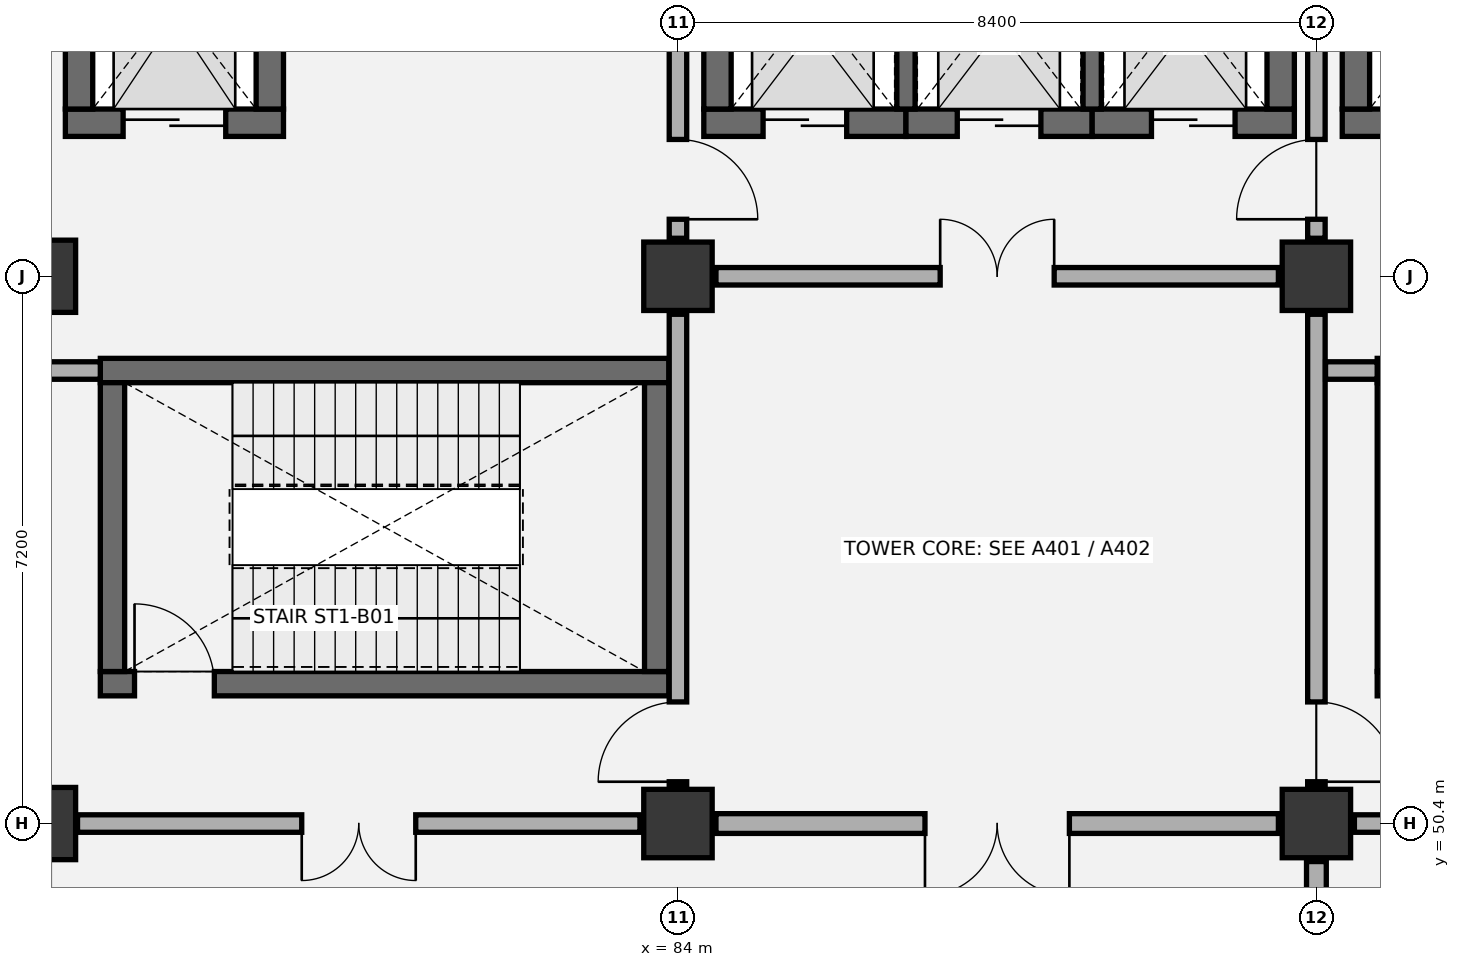
"""IFC4 building model, lengths in metres.
Left out: names, types, materials, properties, quantities, classifications, styles, units other than length and angle.
Written with IfcOpenShell. Run it as: python <this file> out.ifc"""

import sys

from ifc_helpers import new_model, si_unit, direction, frame, frame_2d, origin, origin_2d, place, context, subcontext, project, spatial, rectangle, extrude, element, fill, save


model = new_model("IFC4")
c1 = context("Model", 3, precision=1e-05, world=origin(), true_north=direction((0.0, 1.0)))
c2 = subcontext(c1, "Body", "Model", "MODEL_VIEW")
j1 = project(units=[si_unit("LENGTHUNIT", "METRE"), si_unit("PLANEANGLEUNIT", "RADIAN")], contexts=[c1])
p1 = place(None, origin())
s1 = spatial("IfcSite", under=j1, at=p1, CompositionType="ELEMENT")
p2 = place(p1, origin())
s2 = spatial("IfcBuilding", under=s1, at=p2, CompositionType="ELEMENT")
p3 = place(p2, frame((0.0, 0.0, -4.8)))
s3 = spatial("IfcBuildingStorey", under=s2, at=p3, CompositionType="ELEMENT", Elevation=-4.8)
for number, where, z_axis, x_axis in (
    (1, (75.6, 50.4, 0.0), (0.0, 0.0, 1.0), (1.0, 0.0, 0.0)),
    (2, (75.6, 57.6, 0.0), (0.0, 0.0, 1.0), (1.0, 0.0, 0.0)),
):
    element("IfcColumn", number, at=place(p3, frame(where, z_axis=z_axis, x_axis=x_axis)), inside=s3, PredefinedType="COLUMN", context=c2, shape_type="SweptSolid", body=[
        extrude(rectangle(XDim=0.95, YDim=0.95, at=origin_2d()), origin(), (0.0, 0.0, 1.0), 4.8),
    ])
for number, where, z_axis, x_axis in (
    (3, (84.0, 50.4, 0.0), (0.0, 0.0, 1.0), (1.0, 0.0, 0.0)),
    (4, (84.0, 57.6, 0.0), (0.0, 0.0, 1.0), (1.0, 0.0, 0.0)),
    (5, (92.4, 50.4, 0.0), (0.0, 0.0, 1.0), (1.0, 0.0, 0.0)),
    (6, (92.4, 57.6, 0.0), (0.0, 0.0, 1.0), (1.0, 0.0, 0.0)),
):
    element("IfcColumn", number, at=place(p3, frame(where, z_axis=z_axis, x_axis=x_axis)), inside=s3, PredefinedType="COLUMN", context=c2, shape_type="SweptSolid", body=[
        extrude(rectangle(XDim=0.9, YDim=0.9, at=origin_2d()), origin(), (0.0, 0.0, 1.0), 4.8),
    ])
p4 = place(p3, frame((76.4, 52.24, 0.0), z_axis=(0.0, 0.0, 1.0), x_axis=(1.0, 0.0, 0.0)))
e7 = element("IfcWall", 7, at=p4, inside=s3, PredefinedType="SHEAR", context=c2, shape_type="SweptSolid", body=[
    extrude(rectangle(XDim=7.48, YDim=0.32, at=frame_2d((3.74, 0.0))), origin(), (0.0, 0.0, 1.0), 4.45),
])
p5 = place(p4, frame((0.45, 0.0, 0.0)))
e8 = element("IfcOpeningElement", 8, at=p5, cuts=e7, PredefinedType="OPENING", context=c2, shape_type="SweptSolid", body=[
    extrude(rectangle(XDim=1.05, YDim=2.15, at=frame_2d((0.525, 1.075))), frame((0.0, 0.17, 0.0), z_axis=(0.0, -1.0, 0.0), x_axis=(1.0, 0.0, 0.0)), (0.0, 0.0, 1.0), 0.34),
])
p6 = place(p3, frame((76.4, 56.36, 0.0), z_axis=(0.0, 0.0, 1.0), x_axis=(1.0, 0.0, 0.0)))
e9 = element("IfcWall", 9, at=p6, inside=s3, PredefinedType="SHEAR", context=c2, shape_type="SweptSolid", body=[
    extrude(rectangle(XDim=7.48, YDim=0.32, at=frame_2d((3.74, 0.0))), origin(), (0.0, 0.0, 1.0), 4.45),
])
for number, where, z_axis, x_axis in (
    (10, (76.56, 52.4, 0.0), (0.0, 0.0, 1.0), (0.0, 1.0, 0.0)),
    (11, (83.72, 52.4, 0.0), (0.0, 0.0, 1.0), (0.0, 1.0, 0.0)),
):
    element("IfcWall", number, at=place(p3, frame(where, z_axis=z_axis, x_axis=x_axis)), inside=s3, PredefinedType="SHEAR", context=c2, shape_type="SweptSolid", body=[
        extrude(rectangle(XDim=3.8, YDim=0.32, at=frame_2d((1.9, 0.0))), origin(), (0.0, 0.0, 1.0), 4.45),
    ])
p7 = place(p3, frame((93.2, 52.24, 0.0), z_axis=(0.0, 0.0, 1.0), x_axis=(1.0, 0.0, 0.0)))
e12 = element("IfcWall", 12, at=p7, inside=s3, PredefinedType="SHEAR", context=c2, shape_type="SweptSolid", body=[
    extrude(rectangle(XDim=7.48, YDim=0.32, at=frame_2d((3.74, 0.0))), origin(), (0.0, 0.0, 1.0), 4.45),
])
p8 = place(p7, frame((0.45, 0.0, 0.0)))
e13 = element("IfcOpeningElement", 13, at=p8, cuts=e12, PredefinedType="OPENING", context=c2, shape_type="SweptSolid", body=[
    extrude(rectangle(XDim=1.05, YDim=2.15, at=frame_2d((0.525, 1.075))), frame((0.0, 0.17, 0.0), z_axis=(0.0, -1.0, 0.0), x_axis=(1.0, 0.0, 0.0)), (0.0, 0.0, 1.0), 0.34),
])
p9 = place(p3, frame((93.2, 56.36, 0.0), z_axis=(0.0, 0.0, 1.0), x_axis=(1.0, 0.0, 0.0)))
e14 = element("IfcWall", 14, at=p9, inside=s3, PredefinedType="SHEAR", context=c2, shape_type="SweptSolid", body=[
    extrude(rectangle(XDim=7.48, YDim=0.32, at=frame_2d((3.74, 0.0))), origin(), (0.0, 0.0, 1.0), 4.45),
])
p10 = place(p3, frame((93.36, 52.4, 0.0), z_axis=(0.0, 0.0, 1.0), x_axis=(0.0, 1.0, 0.0)))
e15 = element("IfcWall", 15, at=p10, inside=s3, PredefinedType="SHEAR", context=c2, shape_type="SweptSolid", body=[
    extrude(rectangle(XDim=3.8, YDim=0.32, at=frame_2d((1.9, 0.0))), origin(), (0.0, 0.0, 1.0), 4.45),
])
p11 = place(p3, frame((75.94, 59.62, 0.0), z_axis=(0.0, 0.0, 1.0), x_axis=(1.0, 0.0, 0.0)))
e16 = element("IfcWall", 16, at=p11, inside=s3, PredefinedType="SHEAR", context=c2, shape_type="SweptSolid", body=[
    extrude(rectangle(XDim=2.87, YDim=0.36, at=frame_2d((1.435, 0.0))), origin(), (0.0, 0.0, 1.0), 4.45),
])
p12 = place(p11, frame((0.76, 0.0, 0.0)))
e17 = element("IfcOpeningElement", 17, at=p12, cuts=e16, PredefinedType="OPENING", context=c2, shape_type="SweptSolid", body=[
    extrude(rectangle(XDim=1.35, YDim=2.2, at=frame_2d((0.675, 1.1))), frame((0.0, 0.19, 0.0), z_axis=(0.0, -1.0, 0.0), x_axis=(1.0, 0.0, 0.0)), (0.0, 0.0, 1.0), 0.38),
])
for number, where, z_axis, x_axis in (
    (18, (76.12, 59.8, 0.0), (0.0, 0.0, 1.0), (0.0, 1.0, 0.0)),
    (19, (78.63, 59.8, 0.0), (0.0, 0.0, 1.0), (0.0, 1.0, 0.0)),
):
    element("IfcWall", number, at=place(p3, frame(where, z_axis=z_axis, x_axis=x_axis)), inside=s3, PredefinedType="SHEAR", context=c2, shape_type="SweptSolid", body=[
        extrude(rectangle(XDim=2.8, YDim=0.36, at=frame_2d((1.4, 0.0))), origin(), (0.0, 0.0, 1.0), 4.45),
    ])
p13 = place(p3, frame((84.34, 59.62, 0.0), z_axis=(0.0, 0.0, 1.0), x_axis=(1.0, 0.0, 0.0)))
e20 = element("IfcWall", 20, at=p13, inside=s3, PredefinedType="SHEAR", context=c2, shape_type="SweptSolid", body=[
    extrude(rectangle(XDim=2.66, YDim=0.36, at=frame_2d((1.33, 0.0))), origin(), (0.0, 0.0, 1.0), 4.45),
])
p14 = place(p13, frame((0.78, 0.0, 0.0)))
e21 = element("IfcOpeningElement", 21, at=p14, cuts=e20, PredefinedType="OPENING", context=c2, shape_type="SweptSolid", body=[
    extrude(rectangle(XDim=1.1, YDim=2.15, at=frame_2d((0.55, 1.075))), frame((0.0, 0.19, 0.0), z_axis=(0.0, -1.0, 0.0), x_axis=(1.0, 0.0, 0.0)), (0.0, 0.0, 1.0), 0.38),
])
p15 = place(p3, frame((87.0, 59.62, 0.0), z_axis=(0.0, 0.0, 1.0), x_axis=(1.0, 0.0, 0.0)))
e22 = element("IfcWall", 22, at=p15, inside=s3, PredefinedType="SHEAR", context=c2, shape_type="SweptSolid", body=[
    extrude(rectangle(XDim=2.45, YDim=0.36, at=frame_2d((1.225, 0.0))), origin(), (0.0, 0.0, 1.0), 4.45),
])
p16 = place(p15, frame((0.675, 0.0, 0.0)))
e23 = element("IfcOpeningElement", 23, at=p16, cuts=e22, PredefinedType="OPENING", context=c2, shape_type="SweptSolid", body=[
    extrude(rectangle(XDim=1.1, YDim=2.15, at=frame_2d((0.55, 1.075))), frame((0.0, 0.19, 0.0), z_axis=(0.0, -1.0, 0.0), x_axis=(1.0, 0.0, 0.0)), (0.0, 0.0, 1.0), 0.38),
])
p17 = place(p3, frame((89.45, 59.62, 0.0), z_axis=(0.0, 0.0, 1.0), x_axis=(1.0, 0.0, 0.0)))
e24 = element("IfcWall", 24, at=p17, inside=s3, PredefinedType="SHEAR", context=c2, shape_type="SweptSolid", body=[
    extrude(rectangle(XDim=2.66, YDim=0.36, at=frame_2d((1.33, 0.0))), origin(), (0.0, 0.0, 1.0), 4.45),
])
p18 = place(p17, frame((0.78, 0.0, 0.0)))
e25 = element("IfcOpeningElement", 25, at=p18, cuts=e24, PredefinedType="OPENING", context=c2, shape_type="SweptSolid", body=[
    extrude(rectangle(XDim=1.1, YDim=2.15, at=frame_2d((0.55, 1.075))), frame((0.0, 0.19, 0.0), z_axis=(0.0, -1.0, 0.0), x_axis=(1.0, 0.0, 0.0)), (0.0, 0.0, 1.0), 0.38),
])
for number, where, z_axis, x_axis in (
    (26, (84.52, 59.8, 0.0), (0.0, 0.0, 1.0), (0.0, 1.0, 0.0)),
    (27, (91.93, 59.8, 0.0), (0.0, 0.0, 1.0), (0.0, 1.0, 0.0)),
):
    element("IfcWall", number, at=place(p3, frame(where, z_axis=z_axis, x_axis=x_axis)), inside=s3, PredefinedType="SHEAR", context=c2, shape_type="SweptSolid", body=[
        extrude(rectangle(XDim=2.8, YDim=0.36, at=frame_2d((1.4, 0.0))), origin(), (0.0, 0.0, 1.0), 4.45),
    ])
for number, where, z_axis, x_axis in (
    (28, (87.0, 59.8, 0.0), (0.0, 0.0, 1.0), (0.0, 1.0, 0.0)),
    (29, (89.45, 59.8, 0.0), (0.0, 0.0, 1.0), (0.0, 1.0, 0.0)),
):
    element("IfcWall", number, at=place(p3, frame(where, z_axis=z_axis, x_axis=x_axis)), inside=s3, PredefinedType="SHEAR", context=c2, shape_type="SweptSolid", body=[
        extrude(rectangle(XDim=2.8, YDim=0.24, at=frame_2d((1.4, 0.0))), origin(), (0.0, 0.0, 1.0), 4.45),
    ])
p19 = place(p3, frame((92.74, 59.62, 0.0), z_axis=(0.0, 0.0, 1.0), x_axis=(1.0, 0.0, 0.0)))
e30 = element("IfcWall", 30, at=p19, inside=s3, PredefinedType="SHEAR", context=c2, shape_type="SweptSolid", body=[
    extrude(rectangle(XDim=2.87, YDim=0.36, at=frame_2d((1.435, 0.0))), origin(), (0.0, 0.0, 1.0), 4.45),
])
p20 = place(p19, frame((0.76, 0.0, 0.0)))
e31 = element("IfcOpeningElement", 31, at=p20, cuts=e30, PredefinedType="OPENING", context=c2, shape_type="SweptSolid", body=[
    extrude(rectangle(XDim=1.35, YDim=2.2, at=frame_2d((0.675, 1.1))), frame((0.0, 0.19, 0.0), z_axis=(0.0, -1.0, 0.0), x_axis=(1.0, 0.0, 0.0)), (0.0, 0.0, 1.0), 0.38),
])
p21 = place(p3, frame((92.92, 59.8, 0.0), z_axis=(0.0, 0.0, 1.0), x_axis=(0.0, 1.0, 0.0)))
e32 = element("IfcWall", 32, at=p21, inside=s3, PredefinedType="SHEAR", context=c2, shape_type="SweptSolid", body=[
    extrude(rectangle(XDim=2.8, YDim=0.36, at=frame_2d((1.4, 0.0))), origin(), (0.0, 0.0, 1.0), 4.45),
])
p22 = place(p3, frame((76.1, 50.4, 0.0), z_axis=(0.0, 0.0, 1.0), x_axis=(1.0, 0.0, 0.0)))
e33 = element("IfcWall", 33, at=p22, inside=s3, PredefinedType="PARTITIONING", context=c2, shape_type="SweptSolid", body=[
    extrude(rectangle(XDim=7.4, YDim=0.23, at=frame_2d((3.7, 0.0))), origin(), (0.0, 0.0, 1.0), 3.545),
])
p23 = place(p22, frame((2.95, 0.0, 0.0)))
e34 = element("IfcOpeningElement", 34, at=p23, cuts=e33, PredefinedType="OPENING", context=c2, shape_type="SweptSolid", body=[
    extrude(rectangle(XDim=1.5, YDim=2.15, at=frame_2d((0.75, 1.075))), frame((0.0, 0.125, 0.0), z_axis=(0.0, -1.0, 0.0), x_axis=(1.0, 0.0, 0.0)), (0.0, 0.0, 1.0), 0.25),
])
p24 = place(p3, frame((84.0, 50.9, 0.0), z_axis=(0.0, 0.0, 1.0), x_axis=(0.0, 1.0, 0.0)))
e35 = element("IfcWall", 35, at=p24, inside=s3, PredefinedType="PARTITIONING", context=c2, shape_type="SweptSolid", body=[
    extrude(rectangle(XDim=6.2, YDim=0.23, at=frame_2d((3.1, 0.0))), origin(), (0.0, 0.0, 1.0), 3.645),
])
p25 = place(p24, frame((0.05, 0.0, 0.0)))
e36 = element("IfcOpeningElement", 36, at=p25, cuts=e35, PredefinedType="OPENING", context=c2, shape_type="SweptSolid", body=[
    extrude(rectangle(XDim=1.05, YDim=2.15, at=frame_2d((0.525, 1.075))), frame((0.0, 0.125, 0.0), z_axis=(0.0, -1.0, 0.0), x_axis=(1.0, 0.0, 0.0)), (0.0, 0.0, 1.0), 0.25),
])
p26 = place(p3, frame((75.72, 56.36, 0.0), z_axis=(0.0, 0.0, 1.0), x_axis=(1.0, 0.0, 0.0)))
e37 = element("IfcWall", 37, at=p26, inside=s3, PredefinedType="PARTITIONING", context=c2, shape_type="SweptSolid", body=[
    extrude(rectangle(XDim=0.68, YDim=0.23, at=frame_2d((0.34, 0.0))), origin(), (0.0, 0.0, 1.0), 4.45),
])
p27 = place(p3, frame((84.0, 58.1, 0.0), z_axis=(0.0, 0.0, 1.0), x_axis=(0.0, 1.0, 0.0)))
e38 = element("IfcWall", 38, at=p27, inside=s3, PredefinedType="PARTITIONING", context=c2, shape_type="SweptSolid", body=[
    extrude(rectangle(XDim=6.2, YDim=0.23, at=frame_2d((3.1, 0.0))), origin(), (0.0, 0.0, 1.0), 3.645),
])
p28 = place(p27, frame((0.25, 0.0, 0.0)))
e39 = element("IfcOpeningElement", 39, at=p28, cuts=e38, PredefinedType="OPENING", context=c2, shape_type="SweptSolid", body=[
    extrude(rectangle(XDim=1.05, YDim=2.15, at=frame_2d((0.525, 1.075))), frame((0.0, 0.125, 0.0), z_axis=(0.0, -1.0, 0.0), x_axis=(1.0, 0.0, 0.0)), (0.0, 0.0, 1.0), 0.25),
])
p29 = place(p3, frame((92.4, 43.7, 0.0), z_axis=(0.0, 0.0, 1.0), x_axis=(0.0, 1.0, 0.0)))
e40 = element("IfcWall", 40, at=p29, inside=s3, PredefinedType="PARTITIONING", context=c2, shape_type="SweptSolid", body=[
    extrude(rectangle(XDim=6.2, YDim=0.26, at=frame_2d((3.1, 0.0))), origin(), (0.0, 0.0, 1.0), 3.645),
])
p30 = place(p29, frame((2.1, 0.0, 0.0)))
e41 = element("IfcOpeningElement", 41, at=p30, cuts=e40, PredefinedType="OPENING", context=c2, shape_type="SweptSolid", body=[
    extrude(rectangle(XDim=2.0, YDim=2.35, at=frame_2d((1.0, 1.175))), frame((0.0, 0.14, 0.0), z_axis=(0.0, -1.0, 0.0), x_axis=(1.0, 0.0, 0.0)), (0.0, 0.0, 1.0), 0.28),
])
p31 = place(p3, frame((84.5, 50.4, 0.0), z_axis=(0.0, 0.0, 1.0), x_axis=(1.0, 0.0, 0.0)))
e42 = element("IfcWall", 42, at=p31, inside=s3, PredefinedType="PARTITIONING", context=c2, shape_type="SweptSolid", body=[
    extrude(rectangle(XDim=7.4, YDim=0.26, at=frame_2d((3.7, 0.0))), origin(), (0.0, 0.0, 1.0), 3.545),
])
p32 = place(p31, frame((2.75, 0.0, 0.0)))
e43 = element("IfcOpeningElement", 43, at=p32, cuts=e42, PredefinedType="OPENING", context=c2, shape_type="SweptSolid", body=[
    extrude(rectangle(XDim=1.9, YDim=2.3, at=frame_2d((0.95, 1.15))), frame((0.0, 0.14, 0.0), z_axis=(0.0, -1.0, 0.0), x_axis=(1.0, 0.0, 0.0)), (0.0, 0.0, 1.0), 0.28),
])
p33 = place(p3, frame((92.4, 50.9, 0.0), z_axis=(0.0, 0.0, 1.0), x_axis=(0.0, 1.0, 0.0)))
e44 = element("IfcWall", 44, at=p33, inside=s3, PredefinedType="PARTITIONING", context=c2, shape_type="SweptSolid", body=[
    extrude(rectangle(XDim=6.2, YDim=0.23, at=frame_2d((3.1, 0.0))), origin(), (0.0, 0.0, 1.0), 3.645),
])
p34 = place(p33, frame((0.05, 0.0, 0.0)))
e45 = element("IfcOpeningElement", 45, at=p34, cuts=e44, PredefinedType="OPENING", context=c2, shape_type="SweptSolid", body=[
    extrude(rectangle(XDim=1.05, YDim=2.15, at=frame_2d((0.525, 1.075))), frame((0.0, 0.125, 0.0), z_axis=(0.0, -1.0, 0.0), x_axis=(1.0, 0.0, 0.0)), (0.0, 0.0, 1.0), 0.25),
])
p35 = place(p3, frame((84.5, 57.6, 0.0), z_axis=(0.0, 0.0, 1.0), x_axis=(1.0, 0.0, 0.0)))
e46 = element("IfcWall", 46, at=p35, inside=s3, PredefinedType="PARTITIONING", context=c2, shape_type="SweptSolid", body=[
    extrude(rectangle(XDim=7.4, YDim=0.23, at=frame_2d((3.7, 0.0))), origin(), (0.0, 0.0, 1.0), 3.545),
])
p36 = place(p35, frame((2.95, 0.0, 0.0)))
e47 = element("IfcOpeningElement", 47, at=p36, cuts=e46, PredefinedType="OPENING", context=c2, shape_type="SweptSolid", body=[
    extrude(rectangle(XDim=1.5, YDim=2.15, at=frame_2d((0.75, 1.075))), frame((0.0, 0.125, 0.0), z_axis=(0.0, -1.0, 0.0), x_axis=(1.0, 0.0, 0.0)), (0.0, 0.0, 1.0), 0.25),
])
p37 = place(p3, frame((92.4, 58.1, 0.0), z_axis=(0.0, 0.0, 1.0), x_axis=(0.0, 1.0, 0.0)))
e48 = element("IfcWall", 48, at=p37, inside=s3, PredefinedType="PARTITIONING", context=c2, shape_type="SweptSolid", body=[
    extrude(rectangle(XDim=6.2, YDim=0.23, at=frame_2d((3.1, 0.0))), origin(), (0.0, 0.0, 1.0), 3.645),
])
p38 = place(p37, frame((0.25, 0.0, 0.0)))
e49 = element("IfcOpeningElement", 49, at=p38, cuts=e48, PredefinedType="OPENING", context=c2, shape_type="SweptSolid", body=[
    extrude(rectangle(XDim=1.05, YDim=2.15, at=frame_2d((0.525, 1.075))), frame((0.0, 0.125, 0.0), z_axis=(0.0, -1.0, 0.0), x_axis=(1.0, 0.0, 0.0)), (0.0, 0.0, 1.0), 0.25),
])
p39 = place(p3, frame((92.9, 50.4, 0.0), z_axis=(0.0, 0.0, 1.0), x_axis=(1.0, 0.0, 0.0)))
e50 = element("IfcWall", 50, at=p39, inside=s3, PredefinedType="PARTITIONING", context=c2, shape_type="SweptSolid", body=[
    extrude(rectangle(XDim=7.4, YDim=0.23, at=frame_2d((3.7, 0.0))), origin(), (0.0, 0.0, 1.0), 3.545),
])
p40 = place(p39, frame((2.95, 0.0, 0.0)))
e51 = element("IfcOpeningElement", 51, at=p40, cuts=e50, PredefinedType="OPENING", context=c2, shape_type="SweptSolid", body=[
    extrude(rectangle(XDim=1.5, YDim=2.15, at=frame_2d((0.75, 1.075))), frame((0.0, 0.125, 0.0), z_axis=(0.0, -1.0, 0.0), x_axis=(1.0, 0.0, 0.0)), (0.0, 0.0, 1.0), 0.25),
])
p41 = place(p3, frame((92.52, 56.36, 0.0), z_axis=(0.0, 0.0, 1.0), x_axis=(1.0, 0.0, 0.0)))
e52 = element("IfcWall", 52, at=p41, inside=s3, PredefinedType="PARTITIONING", context=c2, shape_type="SweptSolid", body=[
    extrude(rectangle(XDim=0.68, YDim=0.23, at=frame_2d((0.34, 0.0))), origin(), (0.0, 0.0, 1.0), 4.45),
])
p42 = place(p5, origin())
e53 = element("IfcDoor", 53, at=p42, inside=s3, OperationType="SINGLE_SWING_LEFT", PredefinedType="DOOR", context=c2, shape_type="SweptSolid", body=[
    extrude(rectangle(XDim=1.05, YDim=2.15, at=frame_2d((0.525, 1.075))), frame((0.0, 0.025, 0.0), z_axis=(0.0, -1.0, 0.0), x_axis=(1.0, 0.0, 0.0)), (0.0, 0.0, 1.0), 0.05),
])
fill(e8, e53)
p43 = place(p12, origin())
e54 = element("IfcDoor", 54, at=p43, inside=s3, OperationType="DOUBLE_DOOR_SLIDING", PredefinedType="DOOR", context=c2, shape_type="SweptSolid", body=[
    extrude(rectangle(XDim=1.35, YDim=2.2, at=frame_2d((0.675, 1.1))), frame((0.0, 0.025, 0.0), z_axis=(0.0, -1.0, 0.0), x_axis=(1.0, 0.0, 0.0)), (0.0, 0.0, 1.0), 0.05),
])
fill(e17, e54)
p44 = place(p14, origin())
e55 = element("IfcDoor", 55, at=p44, inside=s3, OperationType="DOUBLE_DOOR_SLIDING", PredefinedType="DOOR", context=c2, shape_type="SweptSolid", body=[
    extrude(rectangle(XDim=1.1, YDim=2.15, at=frame_2d((0.55, 1.075))), frame((0.0, 0.025, 0.0), z_axis=(0.0, -1.0, 0.0), x_axis=(1.0, 0.0, 0.0)), (0.0, 0.0, 1.0), 0.05),
])
fill(e21, e55)
p45 = place(p16, origin())
e56 = element("IfcDoor", 56, at=p45, inside=s3, OperationType="DOUBLE_DOOR_SLIDING", PredefinedType="DOOR", context=c2, shape_type="SweptSolid", body=[
    extrude(rectangle(XDim=1.1, YDim=2.15, at=frame_2d((0.55, 1.075))), frame((0.0, 0.025, 0.0), z_axis=(0.0, -1.0, 0.0), x_axis=(1.0, 0.0, 0.0)), (0.0, 0.0, 1.0), 0.05),
])
fill(e23, e56)
p46 = place(p18, origin())
e57 = element("IfcDoor", 57, at=p46, inside=s3, OperationType="DOUBLE_DOOR_SLIDING", PredefinedType="DOOR", context=c2, shape_type="SweptSolid", body=[
    extrude(rectangle(XDim=1.1, YDim=2.15, at=frame_2d((0.55, 1.075))), frame((0.0, 0.025, 0.0), z_axis=(0.0, -1.0, 0.0), x_axis=(1.0, 0.0, 0.0)), (0.0, 0.0, 1.0), 0.05),
])
fill(e25, e57)
p47 = place(p23, frame((1.5, 0.0, 0.0), z_axis=(0.0, 0.0, 1.0), x_axis=(-1.0, 0.0, 0.0)))
e58 = element("IfcDoor", 58, at=p47, inside=s3, OperationType="DOUBLE_DOOR_SINGLE_SWING", PredefinedType="DOOR", context=c2, shape_type="SweptSolid", body=[
    extrude(rectangle(XDim=1.5, YDim=2.15, at=frame_2d((0.75, 1.075))), frame((0.0, 0.025, 0.0), z_axis=(0.0, -1.0, 0.0), x_axis=(1.0, 0.0, 0.0)), (0.0, 0.0, 1.0), 0.05),
])
fill(e34, e58)
p48 = place(p25, origin())
e59 = element("IfcDoor", 59, at=p48, inside=s3, OperationType="SINGLE_SWING_LEFT", PredefinedType="DOOR", context=c2, shape_type="SweptSolid", body=[
    extrude(rectangle(XDim=1.05, YDim=2.15, at=frame_2d((0.525, 1.075))), frame((0.0, 0.025, 0.0), z_axis=(0.0, -1.0, 0.0), x_axis=(1.0, 0.0, 0.0)), (0.0, 0.0, 1.0), 0.05),
])
fill(e36, e59)
p49 = place(p28, frame((1.05, 0.0, 0.0), z_axis=(0.0, 0.0, 1.0), x_axis=(-1.0, 0.0, 0.0)))
e60 = element("IfcDoor", 60, at=p49, inside=s3, OperationType="SINGLE_SWING_RIGHT", PredefinedType="DOOR", context=c2, shape_type="SweptSolid", body=[
    extrude(rectangle(XDim=1.05, YDim=2.15, at=frame_2d((0.525, 1.075))), frame((0.0, 0.025, 0.0), z_axis=(0.0, -1.0, 0.0), x_axis=(1.0, 0.0, 0.0)), (0.0, 0.0, 1.0), 0.05),
])
fill(e39, e60)
p50 = place(p32, frame((1.9, 0.0, 0.0), z_axis=(0.0, 0.0, 1.0), x_axis=(-1.0, 0.0, 0.0)))
e61 = element("IfcDoor", 61, at=p50, inside=s3, OperationType="DOUBLE_DOOR_SINGLE_SWING", PredefinedType="DOOR", context=c2, shape_type="SweptSolid", body=[
    extrude(rectangle(XDim=1.9, YDim=2.3, at=frame_2d((0.95, 1.15))), frame((0.0, 0.025, 0.0), z_axis=(0.0, -1.0, 0.0), x_axis=(1.0, 0.0, 0.0)), (0.0, 0.0, 1.0), 0.05),
])
fill(e43, e61)
p51 = place(p34, frame((1.05, 0.0, 0.0), z_axis=(0.0, 0.0, 1.0), x_axis=(-1.0, 0.0, 0.0)))
e62 = element("IfcDoor", 62, at=p51, inside=s3, OperationType="SINGLE_SWING_RIGHT", PredefinedType="DOOR", context=c2, shape_type="SweptSolid", body=[
    extrude(rectangle(XDim=1.05, YDim=2.15, at=frame_2d((0.525, 1.075))), frame((0.0, 0.025, 0.0), z_axis=(0.0, -1.0, 0.0), x_axis=(1.0, 0.0, 0.0)), (0.0, 0.0, 1.0), 0.05),
])
fill(e45, e62)
p52 = place(p36, origin())
e63 = element("IfcDoor", 63, at=p52, inside=s3, OperationType="DOUBLE_DOOR_SINGLE_SWING", PredefinedType="DOOR", context=c2, shape_type="SweptSolid", body=[
    extrude(rectangle(XDim=1.5, YDim=2.15, at=frame_2d((0.75, 1.075))), frame((0.0, 0.025, 0.0), z_axis=(0.0, -1.0, 0.0), x_axis=(1.0, 0.0, 0.0)), (0.0, 0.0, 1.0), 0.05),
])
fill(e47, e63)
p53 = place(p38, origin())
e64 = element("IfcDoor", 64, at=p53, inside=s3, OperationType="SINGLE_SWING_LEFT", PredefinedType="DOOR", context=c2, shape_type="SweptSolid", body=[
    extrude(rectangle(XDim=1.05, YDim=2.15, at=frame_2d((0.525, 1.075))), frame((0.0, 0.025, 0.0), z_axis=(0.0, -1.0, 0.0), x_axis=(1.0, 0.0, 0.0)), (0.0, 0.0, 1.0), 0.05),
])
fill(e49, e64)
save(model, sys.argv[1])
